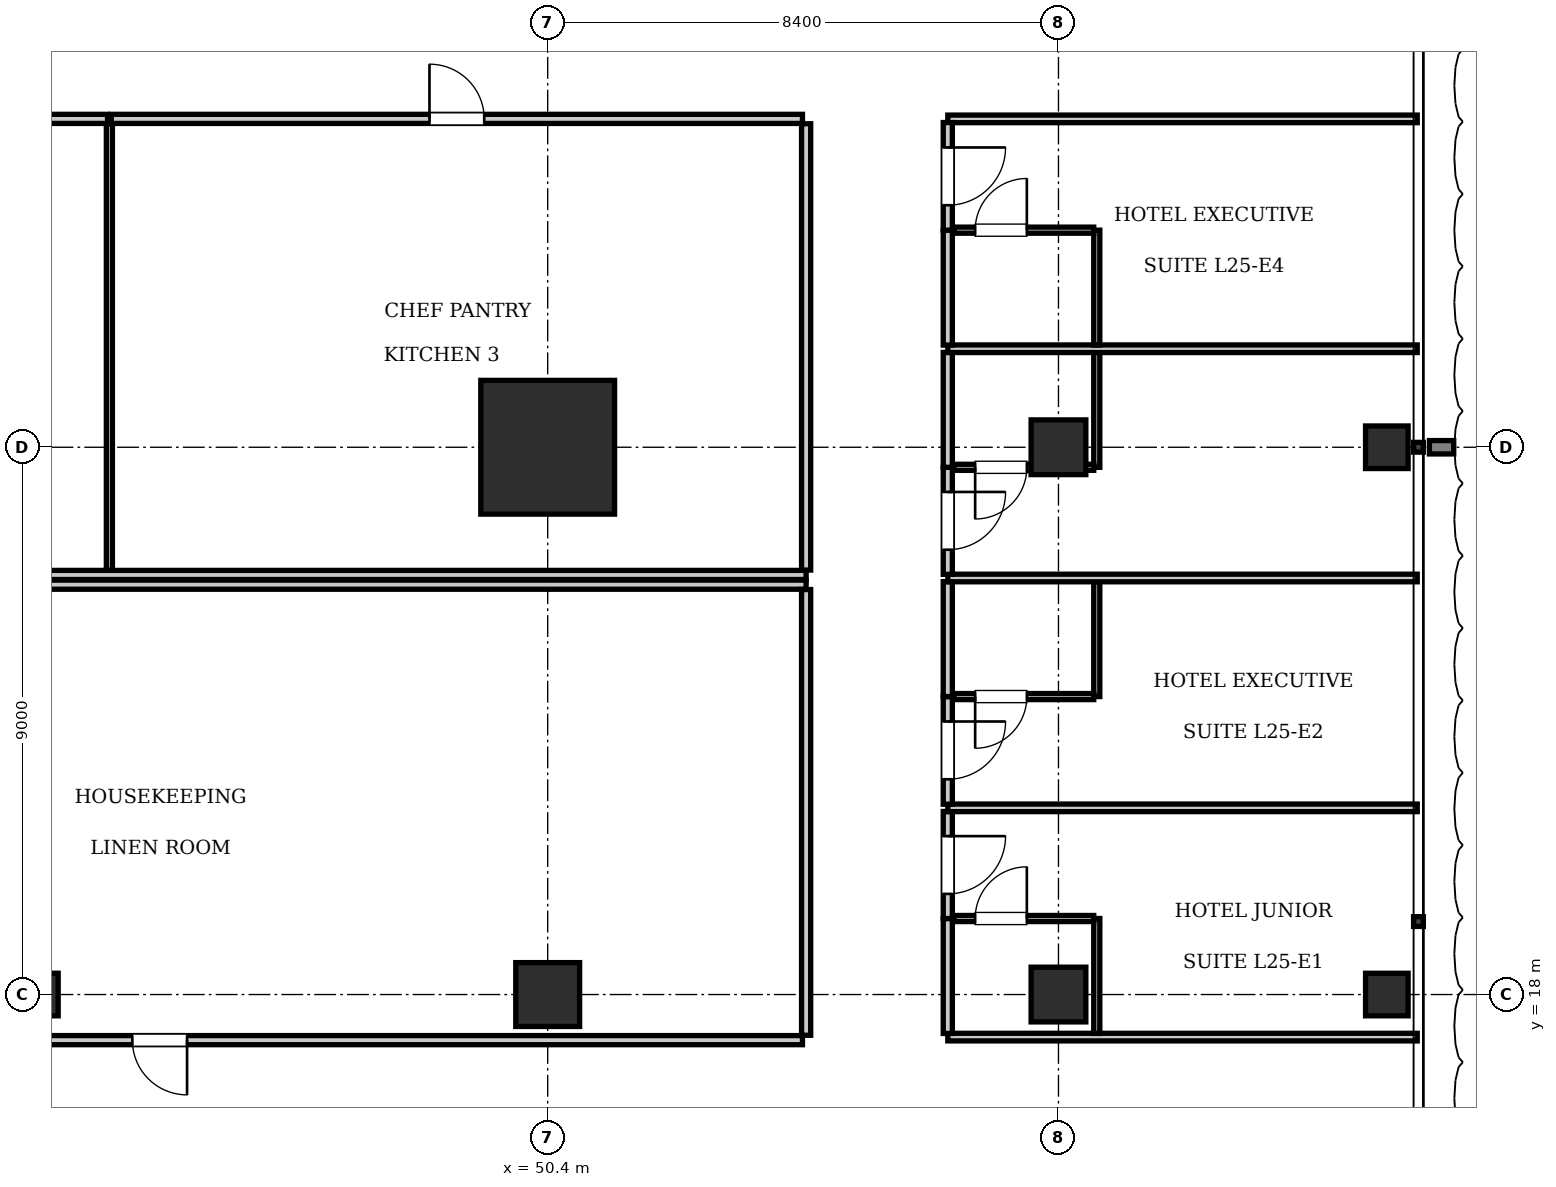
"""IFC4 building model, lengths in metres.
Left out: names, types, materials, properties, quantities, classifications, styles, units other than length and angle.
Written with IfcOpenShell. Run it as: python <this file> out.ifc"""

import sys

from ifc_helpers import new_model, si_unit, direction, frame, frame_2d, origin, origin_2d, place, context, subcontext, project, spatial, rectangle, i_section, extrude, element, fill, save


model = new_model("IFC4")
c1 = context("Model", 3, precision=1e-05, world=origin(), true_north=direction((0.0, 1.0)))
c2 = subcontext(c1, "Body", "Model", "MODEL_VIEW")
j1 = project(units=[si_unit("LENGTHUNIT", "METRE"), si_unit("PLANEANGLEUNIT", "RADIAN")], contexts=[c1])
p1 = place(None, origin())
s1 = spatial("IfcSite", under=j1, at=p1, CompositionType="ELEMENT")
p2 = place(p1, origin())
s2 = spatial("IfcBuilding", under=s1, at=p2, CompositionType="ELEMENT")
p3 = place(p2, frame((0.0, 0.0, 103.95)))
s3 = spatial("IfcBuildingStorey", under=s2, at=p3, CompositionType="ELEMENT", Elevation=103.95)
p4 = place(p3, frame((50.4, 27.0, 0.0), z_axis=(0.0, 0.0, 1.0), x_axis=(1.0, 0.0, 0.0)))
e1 = element("IfcColumn", 1, at=p4, inside=s3, PredefinedType="COLUMN", context=c2, shape_type="SweptSolid", body=[
    extrude(rectangle(XDim=2.2, YDim=2.2, at=origin_2d()), origin(), (0.0, 0.0, 1.0), 3.85),
])
p5 = place(p3, frame((50.4, 18.0, 0.0), z_axis=(0.0, 0.0, 1.0), x_axis=(1.0, 0.0, 0.0)))
e2 = element("IfcColumn", 2, at=p5, inside=s3, PredefinedType="COLUMN", context=c2, shape_type="SweptSolid", body=[
    extrude(rectangle(XDim=1.05, YDim=1.05, at=origin_2d()), origin(), (0.0, 0.0, 1.0), 3.85),
])
p6 = place(p3, frame((42.0, 18.0, 0.0), z_axis=(0.0, 0.0, 1.0), x_axis=(1.0, 0.0, 0.0)))
e3 = element("IfcColumn", 3, at=p6, inside=s3, PredefinedType="COLUMN", context=c2, shape_type="SweptSolid", body=[
    extrude(i_section(OverallWidth=0.7, OverallDepth=0.7, WebThickness=0.028, FlangeThickness=0.044, at=origin_2d()), origin(), (0.0, 0.0, 1.0), 3.85),
])
for number, where, z_axis, x_axis in (
    (4, (58.8, 18.0, 0.0), (0.0, 0.0, 1.0), (1.0, 0.0, 0.0)),
    (5, (58.8, 27.0, 0.0), (0.0, 0.0, 1.0), (1.0, 0.0, 0.0)),
):
    element("IfcColumn", number, at=place(p3, frame(where, z_axis=z_axis, x_axis=x_axis)), inside=s3, PredefinedType="COLUMN", context=c2, shape_type="SweptSolid", body=[
        extrude(rectangle(XDim=0.9, YDim=0.9, at=origin_2d()), origin(), (0.0, 0.0, 1.0), 3.85),
    ])
for number, where, z_axis, x_axis in (
    (6, (64.2, 18.0, 0.0), (0.0, 0.0, 1.0), (1.0, 0.0, 0.0)),
    (7, (64.2, 27.0, 0.0), (0.0, 0.0, 1.0), (1.0, 0.0, 0.0)),
):
    element("IfcColumn", number, at=place(p3, frame(where, z_axis=z_axis, x_axis=x_axis)), inside=s3, PredefinedType="COLUMN", context=c2, shape_type="SweptSolid", body=[
        extrude(i_section(OverallWidth=0.7, OverallDepth=0.7, WebThickness=0.028, FlangeThickness=0.044, at=origin_2d()), origin(), (0.0, 0.0, 1.0), 3.85),
    ])
p7 = place(p3, frame((20.95, 24.9, 0.0), z_axis=(0.0, 0.0, 1.0), x_axis=(1.0, 0.0, 0.0)))
e8 = element("IfcWall", 8, at=p7, inside=s3, PredefinedType="PARTITIONING", context=c2, shape_type="SweptSolid", body=[
    extrude(rectangle(XDim=33.7, YDim=0.15, at=frame_2d((16.85, 0.0))), origin(), (0.0, 0.0, 1.0), 3.61),
])
p8 = place(p3, frame((54.65, 24.98, 0.0), z_axis=(0.0, 0.0, 1.0), x_axis=(0.0, 1.0, 0.0)))
e9 = element("IfcWall", 9, at=p8, inside=s3, PredefinedType="PARTITIONING", context=c2, shape_type="SweptSolid", body=[
    extrude(rectangle(XDim=7.34, YDim=0.15, at=frame_2d((3.67, 0.0))), origin(), (0.0, 0.0, 1.0), 3.293),
])
p9 = place(p3, frame((33.786, 32.4, 0.0), z_axis=(0.0, 0.0, 1.0), x_axis=(1.0, 0.0, 0.0)))
e10 = element("IfcWall", 10, at=p9, inside=s3, PredefinedType="PARTITIONING", context=c2, shape_type="SweptSolid", body=[
    extrude(rectangle(XDim=9.376, YDim=0.15, at=frame_2d((4.688, 0.0))), origin(), (0.0, 0.0, 1.0), 3.61),
])
p10 = place(p9, frame((4.238, 0.0, 0.0)))
e11 = element("IfcOpeningElement", 11, at=p10, cuts=e10, PredefinedType="OPENING", context=c2, shape_type="SweptSolid", body=[
    extrude(rectangle(XDim=0.9, YDim=2.1, at=frame_2d((0.45, 1.05))), frame((0.0, 0.085, 0.0), z_axis=(0.0, -1.0, 0.0), x_axis=(1.0, 0.0, 0.0)), (0.0, 0.0, 1.0), 0.17),
])
p11 = place(p3, frame((43.192, 24.98, 0.0), z_axis=(0.0, 0.0, 1.0), x_axis=(0.0, 1.0, 0.0)))
e12 = element("IfcWall", 12, at=p11, inside=s3, PredefinedType="PARTITIONING", context=c2, shape_type="SweptSolid", body=[
    extrude(rectangle(XDim=7.34, YDim=0.1, at=frame_2d((3.67, 0.0))), origin(), (0.0, 0.0, 1.0), 3.61),
])
p12 = place(p3, frame((43.222, 32.4, 0.0), z_axis=(0.0, 0.0, 1.0), x_axis=(1.0, 0.0, 0.0)))
e13 = element("IfcWall", 13, at=p12, inside=s3, PredefinedType="PARTITIONING", context=c2, shape_type="SweptSolid", body=[
    extrude(rectangle(XDim=11.368, YDim=0.15, at=frame_2d((5.684, 0.0))), origin(), (0.0, 0.0, 1.0), 3.61),
])
p13 = place(p12, frame((5.234, 0.0, 0.0)))
e14 = element("IfcOpeningElement", 14, at=p13, cuts=e13, PredefinedType="OPENING", context=c2, shape_type="SweptSolid", body=[
    extrude(rectangle(XDim=0.9, YDim=2.1, at=frame_2d((0.45, 1.05))), frame((0.0, 0.085, 0.0), z_axis=(0.0, -1.0, 0.0), x_axis=(1.0, 0.0, 0.0)), (0.0, 0.0, 1.0), 0.17),
])
p14 = place(p3, frame((20.95, 24.74, 0.0), z_axis=(0.0, 0.0, 1.0), x_axis=(1.0, 0.0, 0.0)))
e15 = element("IfcWall", 15, at=p14, inside=s3, PredefinedType="PARTITIONING", context=c2, shape_type="SweptSolid", body=[
    extrude(rectangle(XDim=33.7, YDim=0.15, at=frame_2d((16.85, 0.0))), origin(), (0.0, 0.0, 1.0), 3.61),
])
p15 = place(p3, frame((54.65, 17.33, 0.0), z_axis=(0.0, 0.0, 1.0), x_axis=(0.0, 1.0, 0.0)))
e16 = element("IfcWall", 16, at=p15, inside=s3, PredefinedType="PARTITIONING", context=c2, shape_type="SweptSolid", body=[
    extrude(rectangle(XDim=7.33, YDim=0.15, at=frame_2d((3.665, 0.0))), origin(), (0.0, 0.0, 1.0), 3.293),
])
p16 = place(p3, frame((33.449, 17.25, 0.0), z_axis=(0.0, 0.0, 1.0), x_axis=(1.0, 0.0, 0.0)))
e17 = element("IfcWall", 17, at=p16, inside=s3, PredefinedType="PARTITIONING", context=c2, shape_type="SweptSolid", body=[
    extrude(rectangle(XDim=21.141, YDim=0.15, at=frame_2d((10.571, 0.0))), origin(), (0.0, 0.0, 1.0), 3.61),
])
p17 = place(p16, frame((10.121, 0.0, 0.0)))
e18 = element("IfcOpeningElement", 18, at=p17, cuts=e17, PredefinedType="OPENING", context=c2, shape_type="SweptSolid", body=[
    extrude(rectangle(XDim=0.9, YDim=2.1, at=frame_2d((0.45, 1.05))), frame((0.0, 0.085, 0.0), z_axis=(0.0, -1.0, 0.0), x_axis=(1.0, 0.0, 0.0)), (0.0, 0.0, 1.0), 0.17),
])
for number, where, z_axis, x_axis in (
    (19, (56.98, 17.3, 0.0), (0.0, 0.0, 1.0), (1.0, 0.0, 0.0)),
    (20, (56.98, 32.4, 0.0), (0.0, 0.0, 1.0), (1.0, 0.0, 0.0)),
):
    element("IfcWall", number, at=place(p3, frame(where, z_axis=z_axis, x_axis=x_axis)), inside=s3, PredefinedType="PARTITIONING", context=c2, shape_type="SweptSolid", body=[
        extrude(rectangle(XDim=7.72, YDim=0.125, at=frame_2d((3.86, 0.0))), origin(), (0.0, 0.0, 1.0), 3.61),
    ])
p18 = place(p3, frame((56.98, 17.36, 0.0), z_axis=(0.0, 0.0, 1.0), x_axis=(0.0, 1.0, 0.0)))
e21 = element("IfcWall", 21, at=p18, inside=s3, PredefinedType="PARTITIONING", context=c2, shape_type="SweptSolid", body=[
    extrude(rectangle(XDim=1.89, YDim=0.15, at=frame_2d((0.945, 0.0))), origin(), (0.0, 0.0, 1.0), 3.61),
])
p19 = place(p3, frame((56.98, 19.25, 0.0), z_axis=(0.0, 0.0, 1.0), x_axis=(0.0, 1.0, 0.0)))
e22 = element("IfcWall", 22, at=p19, inside=s3, PredefinedType="PARTITIONING", context=c2, shape_type="SweptSolid", body=[
    extrude(rectangle(XDim=1.76, YDim=0.15, at=frame_2d((0.88, 0.0))), origin(), (0.0, 0.0, 1.0), 3.61),
])
p20 = place(p19, frame((0.405, 0.0, 0.0)))
e23 = element("IfcOpeningElement", 23, at=p20, cuts=e22, PredefinedType="OPENING", context=c2, shape_type="SweptSolid", body=[
    extrude(rectangle(XDim=0.95, YDim=2.15, at=frame_2d((0.475, 1.075))), frame((0.0, 0.085, 0.0), z_axis=(0.0, -1.0, 0.0), x_axis=(1.0, 0.0, 0.0)), (0.0, 0.0, 1.0), 0.17),
])
p21 = place(p3, frame((59.43, 17.36, 0.0), z_axis=(0.0, 0.0, 1.0), x_axis=(0.0, 1.0, 0.0)))
e24 = element("IfcWall", 24, at=p21, inside=s3, PredefinedType="PARTITIONING", context=c2, shape_type="SweptSolid", body=[
    extrude(rectangle(XDim=1.89, YDim=0.1, at=frame_2d((0.945, 0.0))), origin(), (0.0, 0.0, 1.0), 3.61),
])
p22 = place(p3, frame((57.08, 19.25, 0.0), z_axis=(0.0, 0.0, 1.0), x_axis=(1.0, 0.0, 0.0)))
e25 = element("IfcWall", 25, at=p22, inside=s3, PredefinedType="PARTITIONING", context=c2, shape_type="SweptSolid", body=[
    extrude(rectangle(XDim=2.3, YDim=0.1, at=frame_2d((1.15, 0.0))), origin(), (0.0, 0.0, 1.0), 3.61),
])
p23 = place(p22, frame((0.35, 0.0, 0.0)))
e26 = element("IfcOpeningElement", 26, at=p23, cuts=e25, PredefinedType="OPENING", context=c2, shape_type="SweptSolid", body=[
    extrude(rectangle(XDim=0.85, YDim=2.1, at=frame_2d((0.425, 1.05))), frame((0.0, 0.06, 0.0), z_axis=(0.0, -1.0, 0.0), x_axis=(1.0, 0.0, 0.0)), (0.0, 0.0, 1.0), 0.12),
])
p24 = place(p3, frame((56.98, 21.07, 0.0), z_axis=(0.0, 0.0, 1.0), x_axis=(1.0, 0.0, 0.0)))
e27 = element("IfcWall", 27, at=p24, inside=s3, PredefinedType="PARTITIONING", context=c2, shape_type="SweptSolid", body=[
    extrude(rectangle(XDim=7.72, YDim=0.125, at=frame_2d((3.86, 0.0))), origin(), (0.0, 0.0, 1.0), 3.61),
])
p25 = place(p3, frame((56.98, 21.13, 0.0), z_axis=(0.0, 0.0, 1.0), x_axis=(0.0, 1.0, 0.0)))
e28 = element("IfcWall", 28, at=p25, inside=s3, PredefinedType="PARTITIONING", context=c2, shape_type="SweptSolid", body=[
    extrude(rectangle(XDim=1.77, YDim=0.15, at=frame_2d((0.885, 0.0))), origin(), (0.0, 0.0, 1.0), 3.61),
])
p26 = place(p25, frame((0.41, 0.0, 0.0)))
e29 = element("IfcOpeningElement", 29, at=p26, cuts=e28, PredefinedType="OPENING", context=c2, shape_type="SweptSolid", body=[
    extrude(rectangle(XDim=0.95, YDim=2.15, at=frame_2d((0.475, 1.075))), frame((0.0, 0.085, 0.0), z_axis=(0.0, -1.0, 0.0), x_axis=(1.0, 0.0, 0.0)), (0.0, 0.0, 1.0), 0.17),
])
p27 = place(p3, frame((56.98, 22.9, 0.0), z_axis=(0.0, 0.0, 1.0), x_axis=(0.0, 1.0, 0.0)))
e30 = element("IfcWall", 30, at=p27, inside=s3, PredefinedType="PARTITIONING", context=c2, shape_type="SweptSolid", body=[
    extrude(rectangle(XDim=1.89, YDim=0.15, at=frame_2d((0.945, 0.0))), origin(), (0.0, 0.0, 1.0), 3.61),
])
p28 = place(p3, frame((59.43, 22.9, 0.0), z_axis=(0.0, 0.0, 1.0), x_axis=(0.0, 1.0, 0.0)))
e31 = element("IfcWall", 31, at=p28, inside=s3, PredefinedType="PARTITIONING", context=c2, shape_type="SweptSolid", body=[
    extrude(rectangle(XDim=1.89, YDim=0.1, at=frame_2d((0.945, 0.0))), origin(), (0.0, 0.0, 1.0), 3.61),
])
p29 = place(p3, frame((57.08, 22.9, 0.0), z_axis=(0.0, 0.0, 1.0), x_axis=(1.0, 0.0, 0.0)))
e32 = element("IfcWall", 32, at=p29, inside=s3, PredefinedType="PARTITIONING", context=c2, shape_type="SweptSolid", body=[
    extrude(rectangle(XDim=2.3, YDim=0.1, at=frame_2d((1.15, 0.0))), origin(), (0.0, 0.0, 1.0), 3.61),
])
p30 = place(p29, frame((0.35, 0.0, 0.0)))
e33 = element("IfcOpeningElement", 33, at=p30, cuts=e32, PredefinedType="OPENING", context=c2, shape_type="SweptSolid", body=[
    extrude(rectangle(XDim=0.85, YDim=2.1, at=frame_2d((0.425, 1.05))), frame((0.0, 0.06, 0.0), z_axis=(0.0, -1.0, 0.0), x_axis=(1.0, 0.0, 0.0)), (0.0, 0.0, 1.0), 0.12),
])
p31 = place(p3, frame((56.98, 24.85, 0.0), z_axis=(0.0, 0.0, 1.0), x_axis=(1.0, 0.0, 0.0)))
e34 = element("IfcWall", 34, at=p31, inside=s3, PredefinedType="PARTITIONING", context=c2, shape_type="SweptSolid", body=[
    extrude(rectangle(XDim=7.72, YDim=0.125, at=frame_2d((3.86, 0.0))), origin(), (0.0, 0.0, 1.0), 3.61),
])
p32 = place(p3, frame((56.98, 24.91, 0.0), z_axis=(0.0, 0.0, 1.0), x_axis=(0.0, 1.0, 0.0)))
e35 = element("IfcWall", 35, at=p32, inside=s3, PredefinedType="PARTITIONING", context=c2, shape_type="SweptSolid", body=[
    extrude(rectangle(XDim=1.76, YDim=0.15, at=frame_2d((0.88, 0.0))), origin(), (0.0, 0.0, 1.0), 3.61),
])
p33 = place(p32, frame((0.405, 0.0, 0.0)))
e36 = element("IfcOpeningElement", 36, at=p33, cuts=e35, PredefinedType="OPENING", context=c2, shape_type="SweptSolid", body=[
    extrude(rectangle(XDim=0.95, YDim=2.15, at=frame_2d((0.475, 1.075))), frame((0.0, 0.085, 0.0), z_axis=(0.0, -1.0, 0.0), x_axis=(1.0, 0.0, 0.0)), (0.0, 0.0, 1.0), 0.17),
])
p34 = place(p3, frame((56.98, 26.67, 0.0), z_axis=(0.0, 0.0, 1.0), x_axis=(0.0, 1.0, 0.0)))
e37 = element("IfcWall", 37, at=p34, inside=s3, PredefinedType="PARTITIONING", context=c2, shape_type="SweptSolid", body=[
    extrude(rectangle(XDim=1.89, YDim=0.15, at=frame_2d((0.945, 0.0))), origin(), (0.0, 0.0, 1.0), 3.61),
])
p35 = place(p3, frame((59.43, 26.67, 0.0), z_axis=(0.0, 0.0, 1.0), x_axis=(0.0, 1.0, 0.0)))
e38 = element("IfcWall", 38, at=p35, inside=s3, PredefinedType="PARTITIONING", context=c2, shape_type="SweptSolid", body=[
    extrude(rectangle(XDim=1.89, YDim=0.1, at=frame_2d((0.945, 0.0))), origin(), (0.0, 0.0, 1.0), 3.61),
])
p36 = place(p3, frame((57.08, 26.67, 0.0), z_axis=(0.0, 0.0, 1.0), x_axis=(1.0, 0.0, 0.0)))
e39 = element("IfcWall", 39, at=p36, inside=s3, PredefinedType="PARTITIONING", context=c2, shape_type="SweptSolid", body=[
    extrude(rectangle(XDim=2.3, YDim=0.1, at=frame_2d((1.15, 0.0))), origin(), (0.0, 0.0, 1.0), 3.61),
])
p37 = place(p36, frame((0.35, 0.0, 0.0)))
e40 = element("IfcOpeningElement", 40, at=p37, cuts=e39, PredefinedType="OPENING", context=c2, shape_type="SweptSolid", body=[
    extrude(rectangle(XDim=0.85, YDim=2.1, at=frame_2d((0.425, 1.05))), frame((0.0, 0.06, 0.0), z_axis=(0.0, -1.0, 0.0), x_axis=(1.0, 0.0, 0.0)), (0.0, 0.0, 1.0), 0.12),
])
p38 = place(p3, frame((56.98, 28.62, 0.0), z_axis=(0.0, 0.0, 1.0), x_axis=(1.0, 0.0, 0.0)))
e41 = element("IfcWall", 41, at=p38, inside=s3, PredefinedType="PARTITIONING", context=c2, shape_type="SweptSolid", body=[
    extrude(rectangle(XDim=7.72, YDim=0.125, at=frame_2d((3.86, 0.0))), origin(), (0.0, 0.0, 1.0), 3.61),
])
p39 = place(p3, frame((56.98, 28.68, 0.0), z_axis=(0.0, 0.0, 1.0), x_axis=(0.0, 1.0, 0.0)))
e42 = element("IfcWall", 42, at=p39, inside=s3, PredefinedType="PARTITIONING", context=c2, shape_type="SweptSolid", body=[
    extrude(rectangle(XDim=1.89, YDim=0.15, at=frame_2d((0.945, 0.0))), origin(), (0.0, 0.0, 1.0), 3.61),
])
p40 = place(p3, frame((56.98, 30.57, 0.0), z_axis=(0.0, 0.0, 1.0), x_axis=(0.0, 1.0, 0.0)))
e43 = element("IfcWall", 43, at=p40, inside=s3, PredefinedType="PARTITIONING", context=c2, shape_type="SweptSolid", body=[
    extrude(rectangle(XDim=1.77, YDim=0.15, at=frame_2d((0.885, 0.0))), origin(), (0.0, 0.0, 1.0), 3.61),
])
p41 = place(p40, frame((0.41, 0.0, 0.0)))
e44 = element("IfcOpeningElement", 44, at=p41, cuts=e43, PredefinedType="OPENING", context=c2, shape_type="SweptSolid", body=[
    extrude(rectangle(XDim=0.95, YDim=2.15, at=frame_2d((0.475, 1.075))), frame((0.0, 0.085, 0.0), z_axis=(0.0, -1.0, 0.0), x_axis=(1.0, 0.0, 0.0)), (0.0, 0.0, 1.0), 0.17),
])
p42 = place(p3, frame((59.43, 28.68, 0.0), z_axis=(0.0, 0.0, 1.0), x_axis=(0.0, 1.0, 0.0)))
e45 = element("IfcWall", 45, at=p42, inside=s3, PredefinedType="PARTITIONING", context=c2, shape_type="SweptSolid", body=[
    extrude(rectangle(XDim=1.89, YDim=0.1, at=frame_2d((0.945, 0.0))), origin(), (0.0, 0.0, 1.0), 3.61),
])
p43 = place(p3, frame((57.08, 30.57, 0.0), z_axis=(0.0, 0.0, 1.0), x_axis=(1.0, 0.0, 0.0)))
e46 = element("IfcWall", 46, at=p43, inside=s3, PredefinedType="PARTITIONING", context=c2, shape_type="SweptSolid", body=[
    extrude(rectangle(XDim=2.3, YDim=0.1, at=frame_2d((1.15, 0.0))), origin(), (0.0, 0.0, 1.0), 3.61),
])
p44 = place(p43, frame((0.35, 0.0, 0.0)))
e47 = element("IfcOpeningElement", 47, at=p44, cuts=e46, PredefinedType="OPENING", context=c2, shape_type="SweptSolid", body=[
    extrude(rectangle(XDim=0.85, YDim=2.1, at=frame_2d((0.425, 1.05))), frame((0.0, 0.06, 0.0), z_axis=(0.0, -1.0, 0.0), x_axis=(1.0, 0.0, 0.0)), (0.0, 0.0, 1.0), 0.12),
])
p45 = place(p13, origin())
e48 = element("IfcDoor", 48, at=p45, inside=s3, OperationType="SINGLE_SWING_LEFT", PredefinedType="DOOR", context=c2, shape_type="SweptSolid", body=[
    extrude(rectangle(XDim=0.9, YDim=2.1, at=frame_2d((0.45, 1.05))), frame((0.0, 0.025, 0.0), z_axis=(0.0, -1.0, 0.0), x_axis=(1.0, 0.0, 0.0)), (0.0, 0.0, 1.0), 0.05),
])
fill(e14, e48)
p46 = place(p17, frame((0.9, 0.0, 0.0), z_axis=(0.0, 0.0, 1.0), x_axis=(-1.0, 0.0, 0.0)))
e49 = element("IfcDoor", 49, at=p46, inside=s3, OperationType="SINGLE_SWING_LEFT", PredefinedType="DOOR", context=c2, shape_type="SweptSolid", body=[
    extrude(rectangle(XDim=0.9, YDim=2.1, at=frame_2d((0.45, 1.05))), frame((0.0, 0.025, 0.0), z_axis=(0.0, -1.0, 0.0), x_axis=(1.0, 0.0, 0.0)), (0.0, 0.0, 1.0), 0.05),
])
fill(e18, e49)
p47 = place(p23, origin())
e50 = element("IfcDoor", 50, at=p47, inside=s3, OperationType="SINGLE_SWING_RIGHT", PredefinedType="DOOR", context=c2, shape_type="SweptSolid", body=[
    extrude(rectangle(XDim=0.85, YDim=2.1, at=frame_2d((0.425, 1.05))), frame((0.0, 0.025, 0.0), z_axis=(0.0, -1.0, 0.0), x_axis=(1.0, 0.0, 0.0)), (0.0, 0.0, 1.0), 0.05),
])
fill(e26, e50)
p48 = place(p20, frame((0.95, 0.0, 0.0), z_axis=(0.0, 0.0, 1.0), x_axis=(-1.0, 0.0, 0.0)))
e51 = element("IfcDoor", 51, at=p48, inside=s3, OperationType="SINGLE_SWING_LEFT", PredefinedType="DOOR", context=c2, shape_type="SweptSolid", body=[
    extrude(rectangle(XDim=0.95, YDim=2.15, at=frame_2d((0.475, 1.075))), frame((0.0, 0.025, 0.0), z_axis=(0.0, -1.0, 0.0), x_axis=(1.0, 0.0, 0.0)), (0.0, 0.0, 1.0), 0.05),
])
fill(e23, e51)
p49 = place(p30, frame((0.85, 0.0, 0.0), z_axis=(0.0, 0.0, 1.0), x_axis=(-1.0, 0.0, 0.0)))
e52 = element("IfcDoor", 52, at=p49, inside=s3, OperationType="SINGLE_SWING_RIGHT", PredefinedType="DOOR", context=c2, shape_type="SweptSolid", body=[
    extrude(rectangle(XDim=0.85, YDim=2.1, at=frame_2d((0.425, 1.05))), frame((0.0, 0.025, 0.0), z_axis=(0.0, -1.0, 0.0), x_axis=(1.0, 0.0, 0.0)), (0.0, 0.0, 1.0), 0.05),
])
fill(e33, e52)
p50 = place(p26, frame((0.95, 0.0, 0.0), z_axis=(0.0, 0.0, 1.0), x_axis=(-1.0, 0.0, 0.0)))
e53 = element("IfcDoor", 53, at=p50, inside=s3, OperationType="SINGLE_SWING_LEFT", PredefinedType="DOOR", context=c2, shape_type="SweptSolid", body=[
    extrude(rectangle(XDim=0.95, YDim=2.15, at=frame_2d((0.475, 1.075))), frame((0.0, 0.025, 0.0), z_axis=(0.0, -1.0, 0.0), x_axis=(1.0, 0.0, 0.0)), (0.0, 0.0, 1.0), 0.05),
])
fill(e29, e53)
p51 = place(p37, frame((0.85, 0.0, 0.0), z_axis=(0.0, 0.0, 1.0), x_axis=(-1.0, 0.0, 0.0)))
e54 = element("IfcDoor", 54, at=p51, inside=s3, OperationType="SINGLE_SWING_RIGHT", PredefinedType="DOOR", context=c2, shape_type="SweptSolid", body=[
    extrude(rectangle(XDim=0.85, YDim=2.1, at=frame_2d((0.425, 1.05))), frame((0.0, 0.025, 0.0), z_axis=(0.0, -1.0, 0.0), x_axis=(1.0, 0.0, 0.0)), (0.0, 0.0, 1.0), 0.05),
])
fill(e40, e54)
p52 = place(p33, frame((0.95, 0.0, 0.0), z_axis=(0.0, 0.0, 1.0), x_axis=(-1.0, 0.0, 0.0)))
e55 = element("IfcDoor", 55, at=p52, inside=s3, OperationType="SINGLE_SWING_LEFT", PredefinedType="DOOR", context=c2, shape_type="SweptSolid", body=[
    extrude(rectangle(XDim=0.95, YDim=2.15, at=frame_2d((0.475, 1.075))), frame((0.0, 0.025, 0.0), z_axis=(0.0, -1.0, 0.0), x_axis=(1.0, 0.0, 0.0)), (0.0, 0.0, 1.0), 0.05),
])
fill(e36, e55)
p53 = place(p44, origin())
e56 = element("IfcDoor", 56, at=p53, inside=s3, OperationType="SINGLE_SWING_RIGHT", PredefinedType="DOOR", context=c2, shape_type="SweptSolid", body=[
    extrude(rectangle(XDim=0.85, YDim=2.1, at=frame_2d((0.425, 1.05))), frame((0.0, 0.025, 0.0), z_axis=(0.0, -1.0, 0.0), x_axis=(1.0, 0.0, 0.0)), (0.0, 0.0, 1.0), 0.05),
])
fill(e47, e56)
p54 = place(p41, frame((0.95, 0.0, 0.0), z_axis=(0.0, 0.0, 1.0), x_axis=(-1.0, 0.0, 0.0)))
e57 = element("IfcDoor", 57, at=p54, inside=s3, OperationType="SINGLE_SWING_LEFT", PredefinedType="DOOR", context=c2, shape_type="SweptSolid", body=[
    extrude(rectangle(XDim=0.95, YDim=2.15, at=frame_2d((0.475, 1.075))), frame((0.0, 0.025, 0.0), z_axis=(0.0, -1.0, 0.0), x_axis=(1.0, 0.0, 0.0)), (0.0, 0.0, 1.0), 0.05),
])
fill(e44, e57)
save(model, sys.argv[1])
